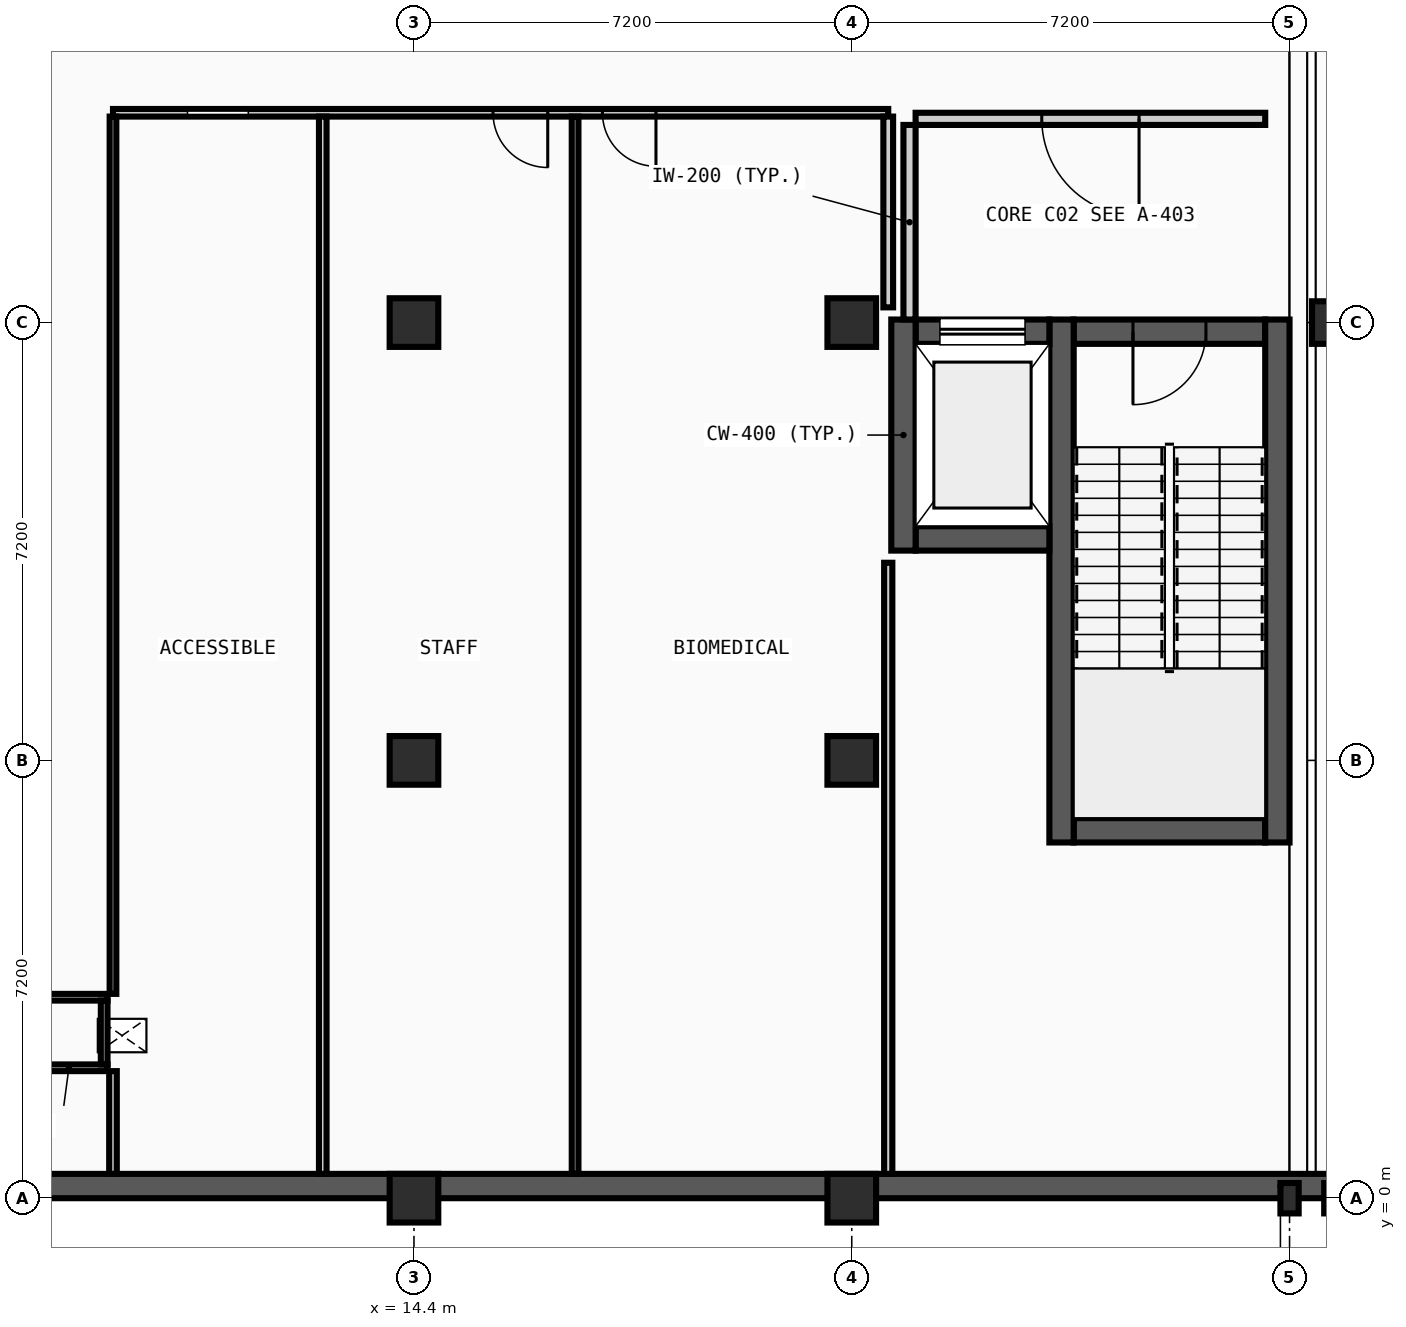
"""IFC4 building model, lengths in metres.
Left out: names, types, materials, properties, quantities, classifications, styles, units other than length and angle.
Written with IfcOpenShell. Run it as: python <this file> out.ifc"""

import sys

from ifc_helpers import new_model, si_unit, direction, frame, frame_2d, origin, origin_2d, place, context, subcontext, project, spatial, rectangle, i_section, extrude, element, fill, save


model = new_model("IFC4")
c1 = context("Model", 3, precision=1e-05, world=origin(), true_north=direction((0.0, 1.0)))
c2 = subcontext(c1, "Body", "Model", "MODEL_VIEW")
j1 = project(units=[si_unit("LENGTHUNIT", "METRE"), si_unit("PLANEANGLEUNIT", "RADIAN")], contexts=[c1])
p1 = place(None, origin())
s1 = spatial("IfcSite", under=j1, at=p1, CompositionType="ELEMENT")
p2 = place(p1, origin())
s2 = spatial("IfcBuilding", under=s1, at=p2, CompositionType="ELEMENT")
p3 = place(p2, frame((0.0, 0.0, -4.8)))
s3 = spatial("IfcBuildingStorey", under=s2, at=p3, CompositionType="ELEMENT", Elevation=-4.8)
for number, where, z_axis, x_axis in (
    (1, (14.4, 0.0, 0.0), (0.0, 0.0, 1.0), (1.0, 0.0, 0.0)),
    (2, (14.4, 7.2, 0.0), (0.0, 0.0, 1.0), (1.0, 0.0, 0.0)),
    (3, (14.4, 14.4, 0.0), (0.0, 0.0, 1.0), (1.0, 0.0, 0.0)),
    (4, (21.6, 0.0, 0.0), (0.0, 0.0, 1.0), (1.0, 0.0, 0.0)),
    (5, (21.6, 7.2, 0.0), (0.0, 0.0, 1.0), (1.0, 0.0, 0.0)),
    (6, (21.6, 14.4, 0.0), (0.0, 0.0, 1.0), (1.0, 0.0, 0.0)),
):
    element("IfcColumn", number, at=place(p3, frame(where, z_axis=z_axis, x_axis=x_axis)), inside=s3, PredefinedType="COLUMN", context=c2, shape_type="SweptSolid", body=[
        extrude(rectangle(XDim=0.8, YDim=0.8, at=origin_2d()), origin(), (0.0, 0.0, 1.0), 4.8),
    ])
for number, where, z_axis, x_axis in (
    (7, (28.8, 0.0, 0.0), (0.0, 0.0, 1.0), (1.0, 0.0, 0.0)),
    (8, (29.52, 0.0, 0.0), (0.0, 0.0, 1.0), (1.0, 0.0, 0.0)),
):
    element("IfcColumn", number, at=place(p3, frame(where, z_axis=z_axis, x_axis=x_axis)), inside=s3, PredefinedType="COLUMN", context=c2, shape_type="SweptSolid", body=[
        extrude(i_section(OverallWidth=0.3, OverallDepth=0.5, WebThickness=0.014, FlangeThickness=0.028, FilletRadius=0.027, at=origin_2d()), origin(), (0.0, 0.0, 1.0), 4.8),
    ])
p4 = place(p3, frame((29.52, 14.4, 0.0), z_axis=(0.0, 0.0, 1.0), x_axis=(1.0, 0.0, 0.0)))
e9 = element("IfcColumn", 9, at=p4, inside=s3, PredefinedType="COLUMN", context=c2, shape_type="SweptSolid", body=[
    extrude(rectangle(XDim=0.7, YDim=0.7, at=origin_2d()), origin(), (0.0, 0.0, 1.0), 4.8),
])
p5 = place(p3, frame((0.0, 0.2, 0.0), z_axis=(0.0, 0.0, 1.0), x_axis=(1.0, 0.0, 0.0)))
e10 = element("IfcWall", 10, at=p5, inside=s3, PredefinedType="USERDEFINED", context=c2, shape_type="SweptSolid", body=[
    extrude(rectangle(XDim=86.4, YDim=0.4, at=frame_2d((43.2, 0.0))), origin(), (0.0, 0.0, 1.0), 4.545),
])
p6 = place(p3, frame((25.25, 6.05, 0.0), z_axis=(0.0, 0.0, 1.0), x_axis=(1.0, 0.0, 0.0)))
e11 = element("IfcWall", 11, at=p6, inside=s3, PredefinedType="SHEAR", context=c2, shape_type="SweptSolid", body=[
    extrude(rectangle(XDim=3.15, YDim=0.4, at=frame_2d((1.575, 0.0))), origin(), (0.0, 0.0, 1.0), 4.545),
])
p7 = place(p3, frame((25.25, 14.25, 0.0), z_axis=(0.0, 0.0, 1.0), x_axis=(1.0, 0.0, 0.0)))
e12 = element("IfcWall", 12, at=p7, inside=s3, PredefinedType="SHEAR", context=c2, shape_type="SweptSolid", body=[
    extrude(rectangle(XDim=3.15, YDim=0.4, at=frame_2d((1.575, 0.0))), origin(), (0.0, 0.0, 1.0), 4.545),
])
p8 = place(p7, frame((0.975, 0.0, 0.0)))
e13 = element("IfcOpeningElement", 13, at=p8, cuts=e12, PredefinedType="OPENING", context=c2, shape_type="SweptSolid", body=[
    extrude(rectangle(XDim=1.2, YDim=2.15, at=frame_2d((0.6, 1.075))), frame((0.0, 0.21, 0.0), z_axis=(0.0, -1.0, 0.0), x_axis=(1.0, 0.0, 0.0)), (0.0, 0.0, 1.0), 0.42),
])
for number, where, z_axis, x_axis in (
    (14, (25.05, 5.85, 0.0), (0.0, 0.0, 1.0), (0.0, 1.0, 0.0)),
    (15, (28.6, 5.85, 0.0), (0.0, 0.0, 1.0), (0.0, 1.0, 0.0)),
):
    element("IfcWall", number, at=place(p3, frame(where, z_axis=z_axis, x_axis=x_axis)), inside=s3, PredefinedType="SHEAR", context=c2, shape_type="SweptSolid", body=[
        extrude(rectangle(XDim=8.6, YDim=0.4, at=frame_2d((4.3, 0.0))), origin(), (0.0, 0.0, 1.0), 4.545),
    ])
p9 = place(p3, frame((22.65, 10.85, 0.0), z_axis=(0.0, 0.0, 1.0), x_axis=(1.0, 0.0, 0.0)))
e16 = element("IfcWall", 16, at=p9, inside=s3, PredefinedType="SHEAR", context=c2, shape_type="SweptSolid", body=[
    extrude(rectangle(XDim=2.2, YDim=0.4, at=frame_2d((1.1, 0.0))), origin(), (0.0, 0.0, 1.0), 4.545),
])
p10 = place(p3, frame((22.65, 14.25, 0.0), z_axis=(0.0, 0.0, 1.0), x_axis=(1.0, 0.0, 0.0)))
e17 = element("IfcWall", 17, at=p10, inside=s3, PredefinedType="SHEAR", context=c2, shape_type="SweptSolid", body=[
    extrude(rectangle(XDim=2.2, YDim=0.4, at=frame_2d((1.1, 0.0))), origin(), (0.0, 0.0, 1.0), 4.545),
])
p11 = place(p10, frame((0.4, 0.0, 0.0)))
e18 = element("IfcOpeningElement", 18, at=p11, cuts=e17, PredefinedType="OPENING", context=c2, shape_type="SweptSolid", body=[
    extrude(rectangle(XDim=1.4, YDim=2.2, at=frame_2d((0.7, 1.1))), frame((0.0, 0.21, 0.0), z_axis=(0.0, -1.0, 0.0), x_axis=(1.0, 0.0, 0.0)), (0.0, 0.0, 1.0), 0.42),
])
p12 = place(p3, frame((22.45, 10.65, 0.0), z_axis=(0.0, 0.0, 1.0), x_axis=(0.0, 1.0, 0.0)))
e19 = element("IfcWall", 19, at=p12, inside=s3, PredefinedType="SHEAR", context=c2, shape_type="SweptSolid", body=[
    extrude(rectangle(XDim=3.8, YDim=0.4, at=frame_2d((1.9, 0.0))), origin(), (0.0, 0.0, 1.0), 4.545),
])
p13 = place(p3, frame((22.65, 17.75, 0.0), z_axis=(0.0, 0.0, 1.0), x_axis=(1.0, 0.0, 0.0)))
e20 = element("IfcWall", 20, at=p13, inside=s3, PredefinedType="PARTITIONING", context=c2, shape_type="SweptSolid", body=[
    extrude(rectangle(XDim=5.75, YDim=0.2, at=frame_2d((2.875, 0.0))), origin(), (0.0, 0.0, 1.0), 4.545),
])
p14 = place(p13, frame((2.075, 0.0, 0.0)))
e21 = element("IfcOpeningElement", 21, at=p14, cuts=e20, PredefinedType="OPENING", context=c2, shape_type="SweptSolid", body=[
    extrude(rectangle(XDim=1.6, YDim=2.2, at=frame_2d((0.8, 1.1))), frame((0.0, 0.11, 0.0), z_axis=(0.0, -1.0, 0.0), x_axis=(1.0, 0.0, 0.0)), (0.0, 0.0, 1.0), 0.22),
])
p15 = place(p3, frame((22.55, 14.45, 0.0), z_axis=(0.0, 0.0, 1.0), x_axis=(0.0, 1.0, 0.0)))
e22 = element("IfcWall", 22, at=p15, inside=s3, PredefinedType="PARTITIONING", context=c2, shape_type="SweptSolid", body=[
    extrude(rectangle(XDim=3.2, YDim=0.2, at=frame_2d((1.6, 0.0))), origin(), (0.0, 0.0, 1.0), 4.545),
])
for number, where, z_axis, x_axis in (
    (23, (8.09, 2.145, 0.0), (0.0, 0.0, 1.0), (1.0, 0.0, 0.0)),
    (24, (8.09, 3.305, 0.0), (0.0, 0.0, 1.0), (1.0, 0.0, 0.0)),
):
    element("IfcWall", number, at=place(p3, frame(where, z_axis=z_axis, x_axis=x_axis)), inside=s3, PredefinedType="PARTITIONING", context=c2, shape_type="SweptSolid", body=[
        extrude(rectangle(XDim=1.27, YDim=0.11, at=frame_2d((0.635, 0.0))), origin(), (0.0, 0.0, 1.0), 4.54),
    ])
p16 = place(p3, frame((9.305, 2.2, 0.0), z_axis=(0.0, 0.0, 1.0), x_axis=(0.0, 1.0, 0.0)))
e25 = element("IfcWall", 25, at=p16, inside=s3, PredefinedType="PARTITIONING", context=c2, shape_type="SweptSolid", body=[
    extrude(rectangle(XDim=1.05, YDim=0.11, at=frame_2d((0.525, 0.0))), origin(), (0.0, 0.0, 1.0), 4.54),
])
p17 = place(p3, frame((9.45, 17.85, 0.0), z_axis=(0.0, 0.0, 1.0), x_axis=(1.0, 0.0, 0.0)))
e26 = element("IfcWall", 26, at=p17, inside=s3, PredefinedType="PARTITIONING", context=c2, shape_type="SweptSolid", body=[
    extrude(rectangle(XDim=12.75, YDim=0.125, at=frame_2d((6.375, 0.0))), origin(), (0.0, 0.0, 1.0), 4.545),
])
p18 = place(p17, frame((1.225, 0.0, 0.0)))
e27 = element("IfcOpeningElement", 27, at=p18, cuts=e26, PredefinedType="OPENING", context=c2, shape_type="SweptSolid", body=[
    extrude(rectangle(XDim=1.0, YDim=2.1, at=frame_2d((0.5, 1.05))), frame((0.0, 0.073, 0.0), z_axis=(0.0, -1.0, 0.0), x_axis=(1.0, 0.0, 0.0)), (0.0, 0.0, 1.0), 0.145),
])
p19 = place(p17, frame((6.25, 0.0, 0.0)))
e28 = element("IfcOpeningElement", 28, at=p19, cuts=e26, PredefinedType="OPENING", context=c2, shape_type="SweptSolid", body=[
    extrude(rectangle(XDim=0.9, YDim=2.1, at=frame_2d((0.45, 1.05))), frame((0.0, 0.073, 0.0), z_axis=(0.0, -1.0, 0.0), x_axis=(1.0, 0.0, 0.0)), (0.0, 0.0, 1.0), 0.145),
])
p20 = place(p17, frame((8.05, 0.0, 0.0)))
e29 = element("IfcOpeningElement", 29, at=p20, cuts=e26, PredefinedType="OPENING", context=c2, shape_type="SweptSolid", body=[
    extrude(rectangle(XDim=0.88, YDim=2.04, at=frame_2d((0.44, 1.02))), frame((0.0, 0.073, 0.0), z_axis=(0.0, -1.0, 0.0), x_axis=(1.0, 0.0, 0.0)), (0.0, 0.0, 1.0), 0.145),
])
p21 = place(p3, frame((9.45, 0.4, 0.0), z_axis=(0.0, 0.0, 1.0), x_axis=(0.0, 1.0, 0.0)))
e30 = element("IfcWall", 30, at=p21, inside=s3, PredefinedType="PARTITIONING", context=c2, shape_type="SweptSolid", body=[
    extrude(rectangle(XDim=1.69, YDim=0.125, at=frame_2d((0.845, 0.0))), origin(), (0.0, 0.0, 1.0), 4.235),
])
p22 = place(p3, frame((9.45, 3.36, 0.0), z_axis=(0.0, 0.0, 1.0), x_axis=(0.0, 1.0, 0.0)))
e31 = element("IfcWall", 31, at=p22, inside=s3, PredefinedType="PARTITIONING", context=c2, shape_type="SweptSolid", body=[
    extrude(rectangle(XDim=14.427, YDim=0.11, at=frame_2d((7.214, 0.0))), origin(), (0.0, 0.0, 1.0), 4.235),
])
p23 = place(p3, frame((12.9, 0.4, 0.0), z_axis=(0.0, 0.0, 1.0), x_axis=(0.0, 1.0, 0.0)))
e32 = element("IfcWall", 32, at=p23, inside=s3, PredefinedType="PARTITIONING", context=c2, shape_type="SweptSolid", body=[
    extrude(rectangle(XDim=17.388, YDim=0.125, at=frame_2d((8.694, 0.0))), origin(), (0.0, 0.0, 1.0), 4.545),
])
p24 = place(p3, frame((17.05, 0.4, 0.0), z_axis=(0.0, 0.0, 1.0), x_axis=(0.0, 1.0, 0.0)))
e33 = element("IfcWall", 33, at=p24, inside=s3, PredefinedType="PARTITIONING", context=c2, shape_type="SweptSolid", body=[
    extrude(rectangle(XDim=17.388, YDim=0.11, at=frame_2d((8.694, 0.0))), origin(), (0.0, 0.0, 1.0), 4.545),
])
p25 = place(p3, frame((22.2, 0.4, 0.0), z_axis=(0.0, 0.0, 1.0), x_axis=(0.0, 1.0, 0.0)))
e34 = element("IfcWall", 34, at=p25, inside=s3, PredefinedType="PARTITIONING", context=c2, shape_type="SweptSolid", body=[
    extrude(rectangle(XDim=10.05, YDim=0.135, at=frame_2d((5.025, 0.0))), origin(), (0.0, 0.0, 1.0), 4.545),
])
p26 = place(p3, frame((22.2, 14.65, 0.0), z_axis=(0.0, 0.0, 1.0), x_axis=(0.0, 1.0, 0.0)))
e35 = element("IfcWall", 35, at=p26, inside=s3, PredefinedType="PARTITIONING", context=c2, shape_type="SweptSolid", body=[
    extrude(rectangle(XDim=3.138, YDim=0.16, at=frame_2d((1.569, 0.0))), origin(), (0.0, 0.0, 1.0), 4.545),
])
p27 = place(p8, frame((1.2, 0.0, 0.0), z_axis=(0.0, 0.0, 1.0), x_axis=(-1.0, 0.0, 0.0)))
e36 = element("IfcDoor", 36, at=p27, inside=s3, OperationType="SINGLE_SWING_LEFT", PredefinedType="DOOR", context=c2, shape_type="SweptSolid", body=[
    extrude(rectangle(XDim=1.2, YDim=2.15, at=frame_2d((0.6, 1.075))), frame((0.0, 0.025, 0.0), z_axis=(0.0, -1.0, 0.0), x_axis=(1.0, 0.0, 0.0)), (0.0, 0.0, 1.0), 0.05),
])
fill(e13, e36)
p28 = place(p11, origin())
e37 = element("IfcDoor", 37, at=p28, inside=s3, OperationType="SLIDING_TO_LEFT", PredefinedType="DOOR", context=c2, shape_type="SweptSolid", body=[
    extrude(rectangle(XDim=1.4, YDim=2.2, at=frame_2d((0.7, 1.1))), frame((0.0, 0.025, 0.0), z_axis=(0.0, -1.0, 0.0), x_axis=(1.0, 0.0, 0.0)), (0.0, 0.0, 1.0), 0.05),
])
fill(e18, e37)
p29 = place(p14, origin())
e38 = element("IfcDoor", 38, at=p29, inside=s3, OperationType="DOUBLE_DOOR_SINGLE_SWING", PredefinedType="DOOR", context=c2, shape_type="SweptSolid", body=[
    extrude(rectangle(XDim=1.6, YDim=2.2, at=frame_2d((0.8, 1.1))), frame((0.0, 0.025, 0.0), z_axis=(0.0, -1.0, 0.0), x_axis=(1.0, 0.0, 0.0)), (0.0, 0.0, 1.0), 0.05),
])
fill(e21, e38)
p30 = place(p18, origin())
e39 = element("IfcDoor", 39, at=p30, inside=s3, OperationType="SLIDING_TO_LEFT", PredefinedType="DOOR", context=c2, shape_type="SweptSolid", body=[
    extrude(rectangle(XDim=1.0, YDim=2.1, at=frame_2d((0.5, 1.05))), frame((0.0, 0.025, 0.0), z_axis=(0.0, -1.0, 0.0), x_axis=(1.0, 0.0, 0.0)), (0.0, 0.0, 1.0), 0.05),
])
fill(e27, e39)
p31 = place(p19, origin())
e40 = element("IfcDoor", 40, at=p31, inside=s3, OperationType="SINGLE_SWING_RIGHT", PredefinedType="DOOR", context=c2, shape_type="SweptSolid", body=[
    extrude(rectangle(XDim=0.9, YDim=2.1, at=frame_2d((0.45, 1.05))), frame((0.0, 0.025, 0.0), z_axis=(0.0, -1.0, 0.0), x_axis=(1.0, 0.0, 0.0)), (0.0, 0.0, 1.0), 0.05),
])
fill(e28, e40)
p32 = place(p20, origin())
e41 = element("IfcDoor", 41, at=p32, inside=s3, OperationType="SINGLE_SWING_RIGHT", PredefinedType="DOOR", context=c2, shape_type="SweptSolid", body=[
    extrude(rectangle(XDim=0.88, YDim=2.04, at=frame_2d((0.44, 1.02))), frame((0.0, 0.025, 0.0), z_axis=(0.0, -1.0, 0.0), x_axis=(1.0, 0.0, 0.0)), (0.0, 0.0, 1.0), 0.05),
])
fill(e29, e41)
save(model, sys.argv[1])
